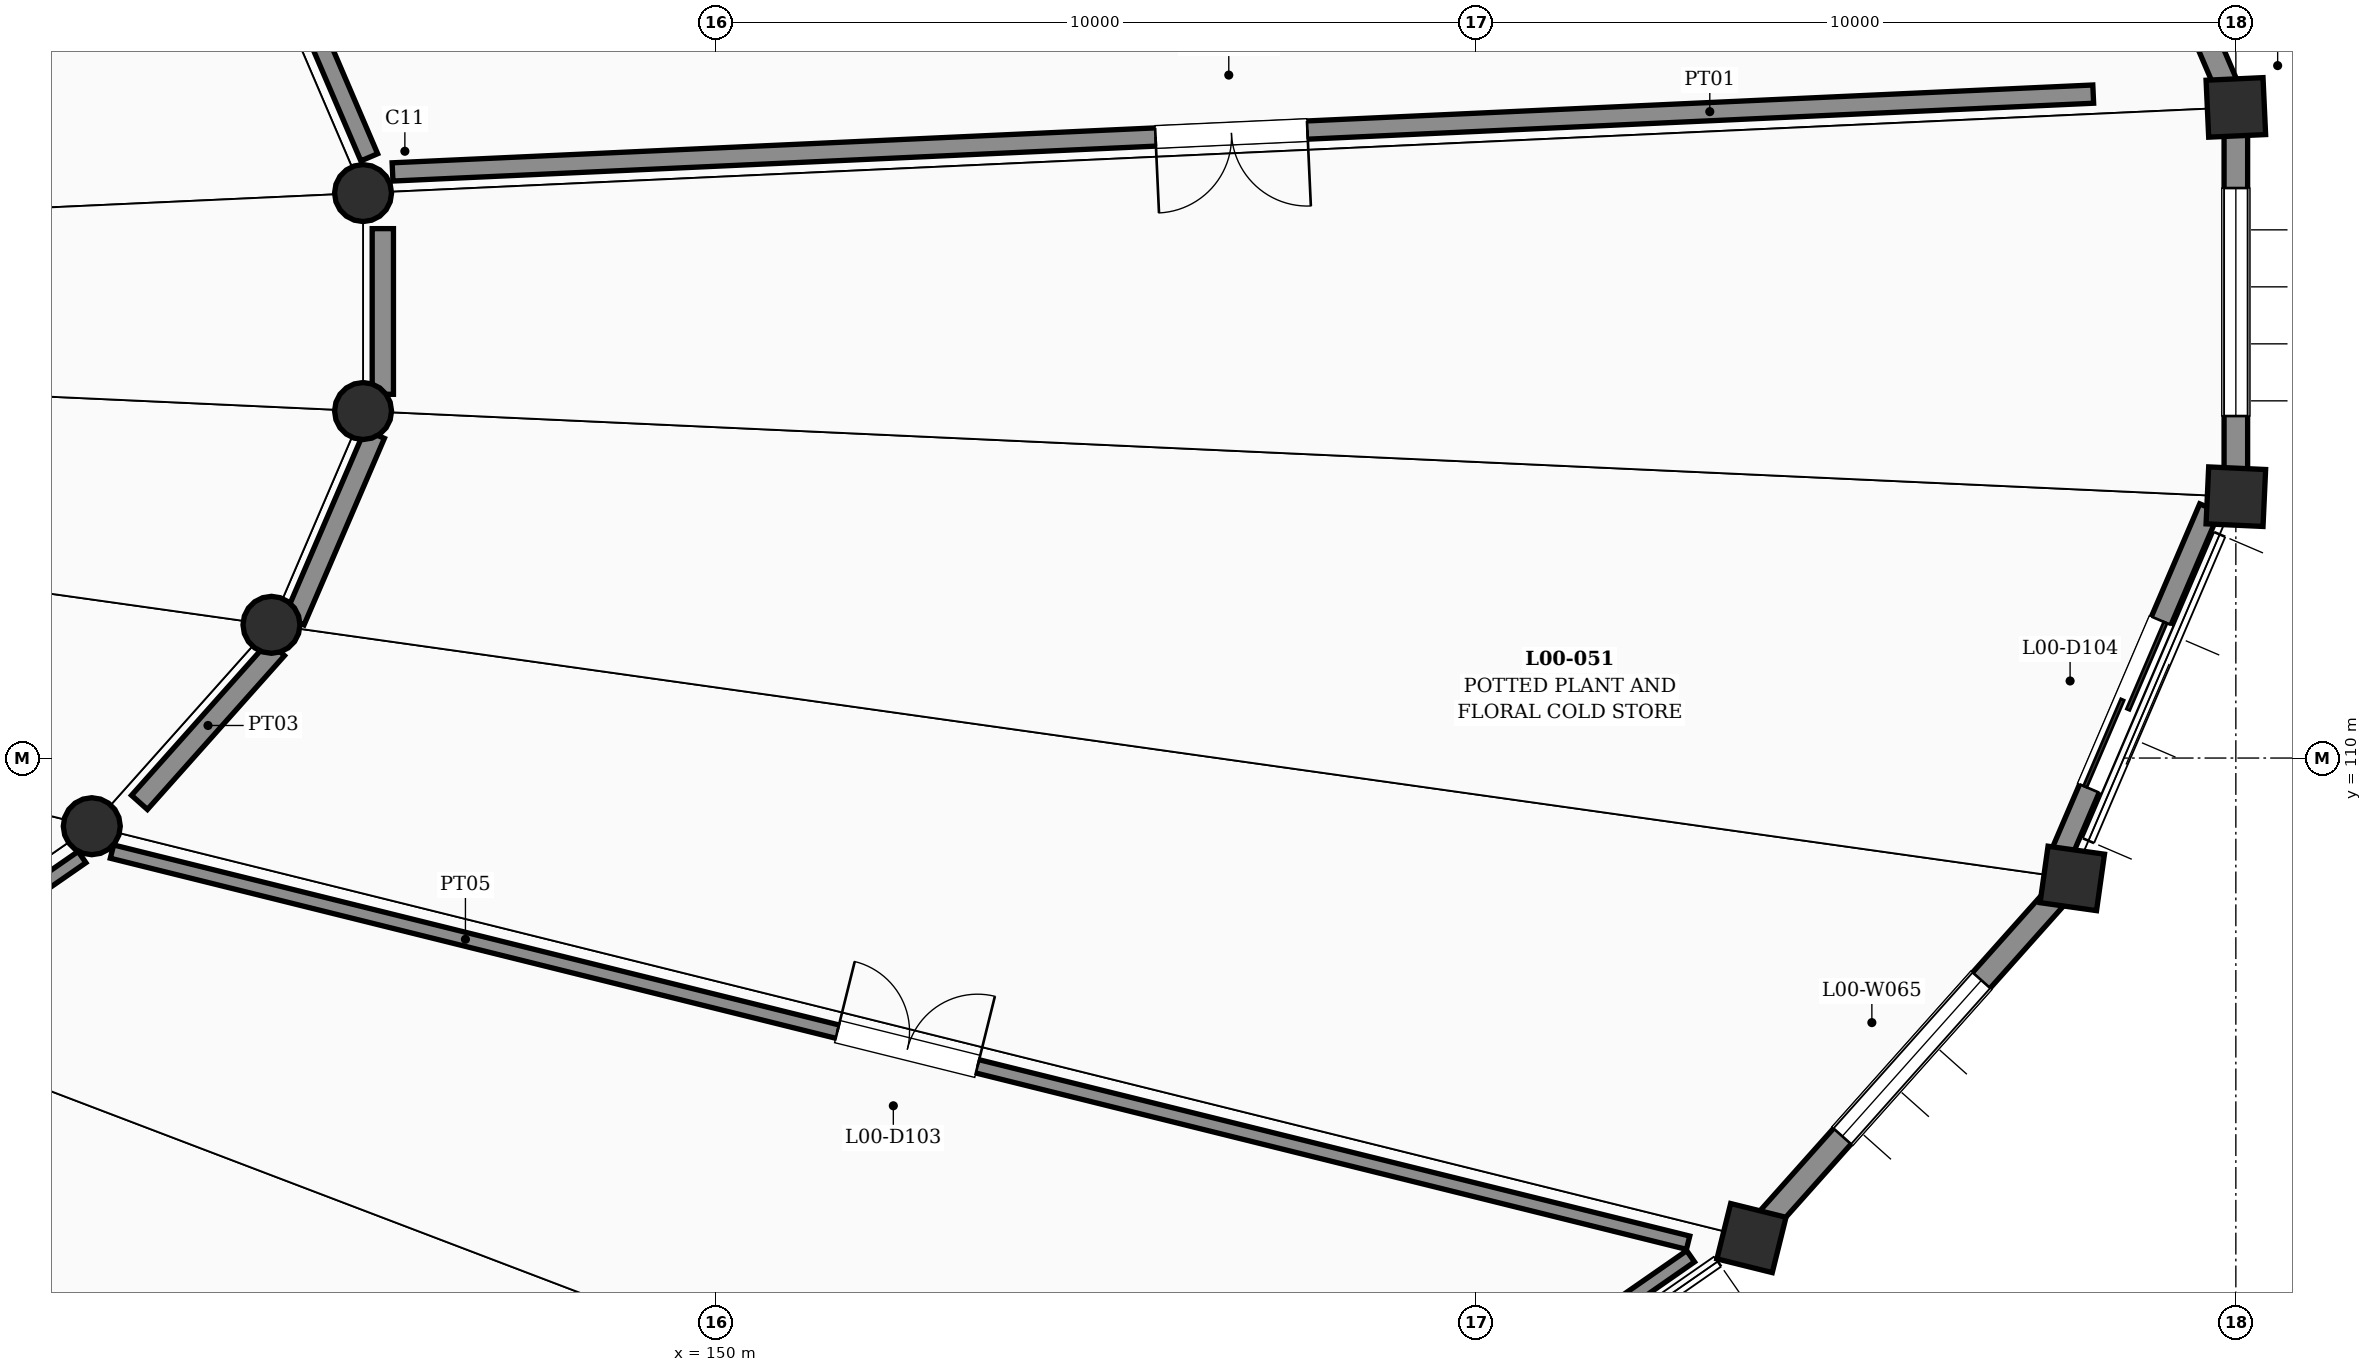
"""IFC4 building model, lengths in metres.
Left out: names, types, materials, properties, quantities, classifications, styles, units other than length and angle.
Written with IfcOpenShell. Run it as: python <this file> out.ifc"""

import sys

from ifc_helpers import new_model, si_unit, direction, frame, frame_2d, origin, origin_2d, place, context, subcontext, project, spatial, rectangle, circle, extrude, element, fill, save


model = new_model("IFC4")
c1 = context("Model", 3, precision=1e-05, world=origin(), true_north=direction((0.0, 1.0)))
c2 = subcontext(c1, "Body", "Model", "MODEL_VIEW")
j1 = project(units=[si_unit("LENGTHUNIT", "METRE"), si_unit("PLANEANGLEUNIT", "RADIAN")], contexts=[c1])
p1 = place(None, origin())
s1 = spatial("IfcSite", under=j1, at=p1, CompositionType="ELEMENT")
p2 = place(p1, origin())
s2 = spatial("IfcBuilding", under=s1, at=p2, CompositionType="ELEMENT")
p3 = place(p2, origin())
s3 = spatial("IfcBuildingStorey", under=s2, at=p3, CompositionType="ELEMENT", Elevation=0.0)
p4 = place(p3, frame((170.0, 118.561, 0.0), z_axis=(0.0, 0.0, 1.0), x_axis=(-0.04571169187, 0.99895467426, 0.0)))
e1 = element("IfcColumn", 1, at=p4, inside=s3, PredefinedType="COLUMN", context=c2, shape_type="SweptSolid", body=[
    extrude(rectangle(XDim=0.75, YDim=0.75, at=origin_2d()), origin(), (0.0, 0.0, 1.0), 6.0),
])
p5 = place(p3, frame((145.36, 117.434, 0.0), z_axis=(0.0, 0.0, 1.0), x_axis=(1.0, 0.0, 0.0)))
e2 = element("IfcColumn", 2, at=p5, inside=s3, PredefinedType="COLUMN", context=c2, shape_type="SweptSolid", body=[
    extrude(circle(Radius=0.375, at=origin_2d()), origin(), (0.0, 0.0, 1.0), 6.0),
])
p6 = place(p3, frame((163.627, 103.684, 0.0), z_axis=(0.0, 0.0, 1.0), x_axis=(0.240905671828, 0.970548534222, 0.0)))
e3 = element("IfcColumn", 3, at=p6, inside=s3, PredefinedType="COLUMN", context=c2, shape_type="SweptSolid", body=[
    extrude(rectangle(XDim=0.75, YDim=0.75, at=origin_2d()), origin(), (0.0, 0.0, 1.0), 6.0),
])
p7 = place(p3, frame((141.791, 109.103, 0.0), z_axis=(0.0, 0.0, 1.0), x_axis=(1.0, 0.0, 0.0)))
e4 = element("IfcColumn", 4, at=p7, inside=s3, PredefinedType="COLUMN", context=c2, shape_type="SweptSolid", body=[
    extrude(circle(Radius=0.375, at=origin_2d()), origin(), (0.0, 0.0, 1.0), 6.0),
])
p8 = place(p3, frame((167.848, 108.416, 0.0), z_axis=(0.0, 0.0, 1.0), x_axis=(0.13951876124, 0.990219427835, 0.0)))
e5 = element("IfcColumn", 5, at=p8, inside=s3, PredefinedType="COLUMN", context=c2, shape_type="SweptSolid", body=[
    extrude(rectangle(XDim=0.75, YDim=0.75, at=origin_2d()), origin(), (0.0, 0.0, 1.0), 6.0),
])
p9 = place(p3, frame((144.155, 111.753, 0.0), z_axis=(0.0, 0.0, 1.0), x_axis=(1.0, 0.0, 0.0)))
e6 = element("IfcColumn", 6, at=p9, inside=s3, PredefinedType="COLUMN", context=c2, shape_type="SweptSolid", body=[
    extrude(circle(Radius=0.375, at=origin_2d()), origin(), (0.0, 0.0, 1.0), 6.0),
])
p10 = place(p3, frame((170.0, 113.439, 0.0), z_axis=(0.0, 0.0, 1.0), x_axis=(0.04571169187, 0.99895467426, 0.0)))
e7 = element("IfcColumn", 7, at=p10, inside=s3, PredefinedType="COLUMN", context=c2, shape_type="SweptSolid", body=[
    extrude(rectangle(XDim=0.75, YDim=0.75, at=origin_2d()), origin(), (0.0, 0.0, 1.0), 6.0),
])
p11 = place(p3, frame((145.36, 114.566, 0.0), z_axis=(0.0, 0.0, 1.0), x_axis=(1.0, 0.0, 0.0)))
e8 = element("IfcColumn", 8, at=p11, inside=s3, PredefinedType="COLUMN", context=c2, shape_type="SweptSolid", body=[
    extrude(circle(Radius=0.375, at=origin_2d()), origin(), (0.0, 0.0, 1.0), 6.0),
])
p12 = place(p3, frame((169.906, 118.781, 0.0), z_axis=(0.0, 0.0, 1.0), x_axis=(-0.393836540118, 0.91918049352, 0.0)))
e9 = element("IfcWall", 9, at=p12, inside=s3, PredefinedType="SOLIDWALL", context=c2, shape_type="SweptSolid", body=[
    extrude(rectangle(XDim=4.985, YDim=0.31, at=frame_2d((2.492, 0.0))), origin(), (0.0, 0.0, 1.0), 4.95),
])
p13 = place(p12, frame((1.492, 0.0, 0.0)))
e10 = element("IfcOpeningElement", 10, at=p13, cuts=e9, PredefinedType="OPENING", context=c2, shape_type="SweptSolid", body=[
    extrude(rectangle(XDim=2.0, YDim=2.4, at=frame_2d((1.0, 1.2))), frame((0.0, 0.165, 0.0), z_axis=(0.0, -1.0, 0.0), x_axis=(1.0, 0.0, 0.0)), (0.0, 0.0, 1.0), 0.33),
])
p14 = place(p3, frame((163.787, 103.863, 0.0), z_axis=(0.0, 0.0, 1.0), x_axis=(0.665655603323, 0.746259082199, 0.0)))
e11 = element("IfcWall", 11, at=p14, inside=s3, PredefinedType="SOLIDWALL", context=c2, shape_type="SweptSolid", body=[
    extrude(rectangle(XDim=5.861, YDim=0.31, at=frame_2d((2.93, 0.0))), origin(), (0.0, 0.0, 1.0), 4.95),
])
p15 = place(p14, frame((1.555, 0.0, 1.05)))
e12 = element("IfcOpeningElement", 12, at=p15, cuts=e11, PredefinedType="OPENING", context=c2, shape_type="SweptSolid", body=[
    extrude(rectangle(XDim=2.75, YDim=1.55, at=frame_2d((1.375, 0.775))), frame((0.0, 0.165, 0.0), z_axis=(0.0, -1.0, 0.0), x_axis=(1.0, 0.0, 0.0)), (0.0, 0.0, 1.0), 0.33),
])
p16 = place(p3, frame((170.0, 113.679, 0.0), z_axis=(0.0, 0.0, 1.0), x_axis=(0.0, 1.0, 0.0)))
e13 = element("IfcWall", 13, at=p16, inside=s3, PredefinedType="SOLIDWALL", context=c2, shape_type="SweptSolid", body=[
    extrude(rectangle(XDim=4.642, YDim=0.31, at=frame_2d((2.321, 0.0))), origin(), (0.0, 0.0, 1.0), 4.95),
])
p17 = place(p16, frame((0.821, 0.0, 1.05)))
e14 = element("IfcOpeningElement", 14, at=p17, cuts=e13, PredefinedType="OPENING", context=c2, shape_type="SweptSolid", body=[
    extrude(rectangle(XDim=3.0, YDim=1.6, at=frame_2d((1.5, 0.8))), frame((0.0, 0.165, 0.0), z_axis=(0.0, -1.0, 0.0), x_axis=(1.0, 0.0, 0.0)), (0.0, 0.0, 1.0), 0.33),
])
p18 = place(p3, frame((168.124, 118.736, 0.0), z_axis=(0.0, 0.0, 1.0), x_axis=(-0.998955125277, -0.045701834571, 0.0)))
e15 = element("IfcWall", 15, at=p18, inside=s3, PredefinedType="PARTITIONING", context=c2, shape_type="SweptSolid", body=[
    extrude(rectangle(XDim=22.399, YDim=0.24, at=frame_2d((11.2, 0.0))), origin(), (0.0, 0.0, 1.0), 4.85),
])
p19 = place(p18, frame((10.35, 0.0, 0.0)))
e16 = element("IfcOpeningElement", 16, at=p19, cuts=e15, PredefinedType="OPENING", context=c2, shape_type="SweptSolid", body=[
    extrude(rectangle(XDim=2.0, YDim=2.35, at=frame_2d((1.0, 1.175))), frame((0.0, 0.13, 0.0), z_axis=(0.0, -1.0, 0.0), x_axis=(1.0, 0.0, 0.0)), (0.0, 0.0, 1.0), 0.26),
])
p20 = place(p3, frame((145.441, 117.904, 0.0), z_axis=(0.0, 0.0, 1.0), x_axis=(-0.39375043344, 0.919217382432, 0.0)))
e17 = element("IfcWall", 17, at=p20, inside=s3, PredefinedType="PARTITIONING", context=c2, shape_type="SweptSolid", body=[
    extrude(rectangle(XDim=2.443, YDim=0.24, at=frame_2d((1.221, 0.0))), origin(), (0.0, 0.0, 1.0), 4.85),
])
p21 = place(p3, frame((138.649, 106.608, 0.0), z_axis=(0.0, 0.0, 1.0), x_axis=(0.821916413941, 0.569608118354, 0.0)))
e18 = element("IfcWall", 18, at=p21, inside=s3, PredefinedType="PARTITIONING", context=c2, shape_type="SweptSolid", body=[
    extrude(rectangle(XDim=3.666, YDim=0.18, at=frame_2d((1.833, 0.0))), origin(), (0.0, 0.0, 1.0), 4.85),
])
p22 = place(p3, frame((142.056, 108.769, 0.0), z_axis=(0.0, 0.0, 1.0), x_axis=(0.970562474768, -0.240849501915, 0.0)))
e19 = element("IfcWall", 19, at=p22, inside=s3, PredefinedType="PARTITIONING", context=c2, shape_type="SweptSolid", body=[
    extrude(rectangle(XDim=21.366, YDim=0.18, at=frame_2d((10.683, 0.0))), origin(), (0.0, 0.0, 1.0), 4.85),
])
p23 = place(p22, frame((9.833, 0.0, 0.0)))
e20 = element("IfcOpeningElement", 20, at=p23, cuts=e19, PredefinedType="OPENING", context=c2, shape_type="SweptSolid", body=[
    extrude(rectangle(XDim=1.9, YDim=2.3, at=frame_2d((0.95, 1.15))), frame((0.0, 0.1, 0.0), z_axis=(0.0, -1.0, 0.0), x_axis=(1.0, 0.0, 0.0)), (0.0, 0.0, 1.0), 0.2),
])
p24 = place(p3, frame((162.826, 103.445, 0.0), z_axis=(0.0, 0.0, 1.0), x_axis=(-0.821236459211, -0.570588010794, 0.0)))
e21 = element("IfcWall", 21, at=p24, inside=s3, PredefinedType="PARTITIONING", context=c2, shape_type="SweptSolid", body=[
    extrude(rectangle(XDim=6.427, YDim=0.18, at=frame_2d((3.213, 0.0))), origin(), (0.0, 0.0, 1.0), 4.95),
])
p25 = place(p3, frame((142.418, 109.416, 0.0), z_axis=(0.0, 0.0, 1.0), x_axis=(0.665185048373, 0.746678546244, 0.0)))
e22 = element("IfcWall", 22, at=p25, inside=s3, PredefinedType="PARTITIONING", context=c2, shape_type="SweptSolid", body=[
    extrude(rectangle(XDim=2.711, YDim=0.28, at=frame_2d((1.355, 0.0))), origin(), (0.0, 0.0, 1.0), 4.85),
])
p26 = place(p3, frame((144.455, 111.807, 0.0), z_axis=(0.0, 0.0, 1.0), x_axis=(0.395440155108, 0.918491743963, 0.0)))
e23 = element("IfcWall", 23, at=p26, inside=s3, PredefinedType="PARTITIONING", context=c2, shape_type="SweptSolid", body=[
    extrude(rectangle(XDim=2.673, YDim=0.28, at=frame_2d((1.336, 0.0))), origin(), (0.0, 0.0, 1.0), 4.85),
])
p27 = place(p3, frame((145.62, 114.786, 0.0), z_axis=(0.0, 0.0, 1.0), x_axis=(0.0, 1.0, 0.0)))
e24 = element("IfcWall", 24, at=p27, inside=s3, PredefinedType="PARTITIONING", context=c2, shape_type="SweptSolid", body=[
    extrude(rectangle(XDim=2.18, YDim=0.28, at=frame_2d((1.09, 0.0))), origin(), (0.0, 0.0, 1.0), 4.85),
])
p28 = place(p3, frame((169.653, 113.29, 0.0), z_axis=(0.0, 0.0, 1.0), x_axis=(-0.393751898681, -0.919216754789, 0.0)))
e25 = element("IfcWall", 25, at=p28, inside=s3, PredefinedType="PARTITIONING", context=c2, shape_type="SweptSolid", body=[
    extrude(rectangle(XDim=4.929, YDim=0.28, at=frame_2d((2.464, 0.0))), origin(), (0.0, 0.0, 1.0), 4.95),
])
p29 = place(p28, frame((1.614, 0.0, 0.0)))
e26 = element("IfcOpeningElement", 26, at=p29, cuts=e25, PredefinedType="OPENING", context=c2, shape_type="SweptSolid", body=[
    extrude(rectangle(XDim=2.4, YDim=2.45, at=frame_2d((1.2, 1.225))), frame((0.0, 0.15, 0.0), z_axis=(0.0, -1.0, 0.0), x_axis=(1.0, 0.0, 0.0)), (0.0, 0.0, 1.0), 0.3),
])
p30 = place(p15, origin())
e27 = element("IfcWindow", 27, at=p30, inside=s3, PartitioningType="SINGLE_PANEL", PredefinedType="WINDOW", context=c2, shape_type="SweptSolid", body=[
    extrude(rectangle(XDim=2.75, YDim=1.55, at=frame_2d((1.375, 0.775))), frame((0.0, 0.03, 0.0), z_axis=(0.0, -1.0, 0.0), x_axis=(1.0, 0.0, 0.0)), (0.0, 0.0, 1.0), 0.06),
])
fill(e12, e27)
p31 = place(p17, origin())
e28 = element("IfcWindow", 28, at=p31, inside=s3, PartitioningType="SINGLE_PANEL", PredefinedType="WINDOW", context=c2, shape_type="SweptSolid", body=[
    extrude(rectangle(XDim=3.0, YDim=1.6, at=frame_2d((1.5, 0.8))), frame((0.0, 0.03, 0.0), z_axis=(0.0, -1.0, 0.0), x_axis=(1.0, 0.0, 0.0)), (0.0, 0.0, 1.0), 0.06),
])
fill(e14, e28)
p32 = place(p19, origin())
e29 = element("IfcDoor", 29, at=p32, inside=s3, OperationType="DOUBLE_DOOR_SINGLE_SWING", PredefinedType="DOOR", context=c2, shape_type="SweptSolid", body=[
    extrude(rectangle(XDim=2.0, YDim=2.35, at=frame_2d((1.0, 1.175))), frame((0.0, 0.025, 0.0), z_axis=(0.0, -1.0, 0.0), x_axis=(1.0, 0.0, 0.0)), (0.0, 0.0, 1.0), 0.05),
])
fill(e16, e29)
p33 = place(p23, origin())
e30 = element("IfcDoor", 30, at=p33, inside=s3, OperationType="DOUBLE_DOOR_SINGLE_SWING", PredefinedType="DOOR", context=c2, shape_type="SweptSolid", body=[
    extrude(rectangle(XDim=1.9, YDim=2.3, at=frame_2d((0.95, 1.15))), frame((0.0, 0.025, 0.0), z_axis=(0.0, -1.0, 0.0), x_axis=(1.0, 0.0, 0.0)), (0.0, 0.0, 1.0), 0.05),
])
fill(e20, e30)
p34 = place(p29, origin())
e31 = element("IfcDoor", 31, at=p34, inside=s3, OperationType="DOUBLE_DOOR_SLIDING", PredefinedType="DOOR", context=c2, shape_type="SweptSolid", body=[
    extrude(rectangle(XDim=2.4, YDim=2.45, at=frame_2d((1.2, 1.225))), frame((0.0, 0.025, 0.0), z_axis=(0.0, -1.0, 0.0), x_axis=(1.0, 0.0, 0.0)), (0.0, 0.0, 1.0), 0.05),
])
fill(e26, e31)
save(model, sys.argv[1])
